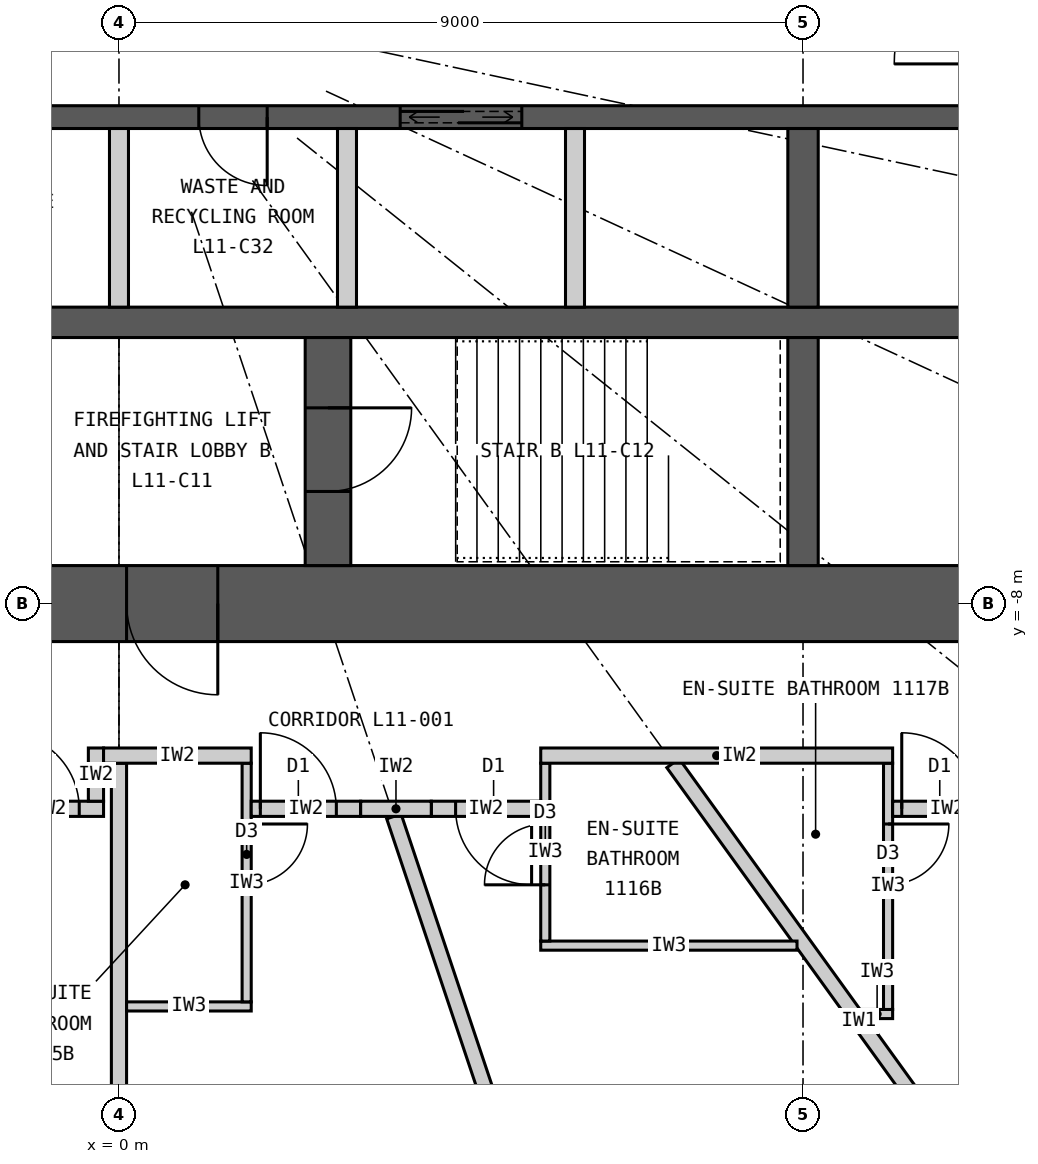
"""IFC4 building model, lengths in metres.
Left out: names, types, materials, properties, quantities, classifications, styles, units other than length and angle.
Written with IfcOpenShell. Run it as: python <this file> out.ifc"""

import sys

from ifc_helpers import new_model, si_unit, direction, frame, frame_2d, origin, place, context, subcontext, project, spatial, rectangle, extrude, element, fill, save


model = new_model("IFC4")
c1 = context("Model", 3, precision=1e-05, world=origin(), true_north=direction((0.0, 1.0)))
c2 = subcontext(c1, "Body", "Model", "MODEL_VIEW")
j1 = project(units=[si_unit("LENGTHUNIT", "METRE"), si_unit("PLANEANGLEUNIT", "RADIAN")], contexts=[c1])
p1 = place(None, origin())
s1 = spatial("IfcSite", under=j1, at=p1, CompositionType="ELEMENT")
p2 = place(p1, origin())
s2 = spatial("IfcBuilding", under=s1, at=p2, CompositionType="ELEMENT")
p3 = place(p2, frame((0.0, 0.0, 50.7)))
s3 = spatial("IfcBuildingStorey", under=s2, at=p3, CompositionType="ELEMENT", Elevation=50.7)
p4 = place(p3, frame((12.5, -8.0, 0.0), z_axis=(0.0, 0.0, 1.0), x_axis=(-1.0, 0.0, 0.0)))
e1 = element("IfcWall", 1, at=p4, inside=s3, PredefinedType="SHEAR", context=c2, shape_type="SweptSolid", body=[
    extrude(rectangle(XDim=25.0, YDim=1.0, at=frame_2d((12.5, 0.0))), origin(), (0.0, 0.0, 1.0), 3.3),
])
p5 = place(p4, frame((11.2, 0.0, 0.0)))
e2 = element("IfcOpeningElement", 2, at=p5, cuts=e1, PredefinedType="OPENING", context=c2, shape_type="SweptSolid", body=[
    extrude(rectangle(XDim=1.2, YDim=2.2, at=frame_2d((0.6, 1.1))), frame((0.0, 0.51, 0.0), z_axis=(0.0, -1.0, 0.0), x_axis=(1.0, 0.0, 0.0)), (0.0, 0.0, 1.0), 1.02),
])
p6 = place(p4, frame((18.8, 0.0, 0.0)))
e3 = element("IfcOpeningElement", 3, at=p6, cuts=e1, PredefinedType="OPENING", context=c2, shape_type="SweptSolid", body=[
    extrude(rectangle(XDim=0.9, YDim=2.2, at=frame_2d((0.45, 1.1))), frame((0.0, 0.51, 0.0), z_axis=(0.0, -1.0, 0.0), x_axis=(1.0, 0.0, 0.0)), (0.0, 0.0, 1.0), 1.02),
])
p7 = place(p3, frame((-11.5, -4.3, 0.0), z_axis=(0.0, 0.0, 1.0), x_axis=(1.0, 0.0, 0.0)))
e4 = element("IfcWall", 4, at=p7, inside=s3, PredefinedType="SHEAR", context=c2, shape_type="SweptSolid", body=[
    extrude(rectangle(XDim=23.0, YDim=0.4, at=frame_2d((11.5, 0.0))), origin(), (0.0, 0.0, 1.0), 3.3),
])
p8 = place(p3, frame((-11.5, -1.6, 0.0), z_axis=(0.0, 0.0, 1.0), x_axis=(1.0, 0.0, 0.0)))
e5 = element("IfcWall", 5, at=p8, inside=s3, PredefinedType="SHEAR", context=c2, shape_type="SweptSolid", body=[
    extrude(rectangle(XDim=23.0, YDim=0.3, at=frame_2d((11.5, 0.0))), origin(), (0.0, 0.0, 1.0), 3.3),
])
p9 = place(p8, frame((0.45, 0.0, 0.0)))
e6 = element("IfcOpeningElement", 6, at=p9, cuts=e5, PredefinedType="OPENING", context=c2, shape_type="SweptSolid", body=[
    extrude(rectangle(XDim=1.1, YDim=2.2, at=frame_2d((0.55, 1.1))), frame((0.0, 0.16, 0.0), z_axis=(0.0, -1.0, 0.0), x_axis=(1.0, 0.0, 0.0)), (0.0, 0.0, 1.0), 0.32),
])
p10 = place(p8, frame((3.45, 0.0, 0.0)))
e7 = element("IfcOpeningElement", 7, at=p10, cuts=e5, PredefinedType="OPENING", context=c2, shape_type="SweptSolid", body=[
    extrude(rectangle(XDim=1.1, YDim=2.2, at=frame_2d((0.55, 1.1))), frame((0.0, 0.16, 0.0), z_axis=(0.0, -1.0, 0.0), x_axis=(1.0, 0.0, 0.0)), (0.0, 0.0, 1.0), 0.32),
])
p11 = place(p8, frame((15.2, 0.0, 0.0)))
e8 = element("IfcOpeningElement", 8, at=p11, cuts=e5, PredefinedType="OPENING", context=c2, shape_type="SweptSolid", body=[
    extrude(rectangle(XDim=1.6, YDim=2.4, at=frame_2d((0.8, 1.2))), frame((0.0, 0.16, 0.0), z_axis=(0.0, -1.0, 0.0), x_axis=(1.0, 0.0, 0.0)), (0.0, 0.0, 1.0), 0.32),
])
p12 = place(p8, frame((8.05, 0.0, 0.0)))
e9 = element("IfcOpeningElement", 9, at=p12, cuts=e5, PredefinedType="OPENING", context=c2, shape_type="SweptSolid", body=[
    extrude(rectangle(XDim=0.9, YDim=2.2, at=frame_2d((0.45, 1.1))), frame((0.0, 0.16, 0.0), z_axis=(0.0, -1.0, 0.0), x_axis=(1.0, 0.0, 0.0)), (0.0, 0.0, 1.0), 0.32),
])
p13 = place(p8, frame((12.55, 0.0, 0.0)))
e10 = element("IfcOpeningElement", 10, at=p13, cuts=e5, PredefinedType="OPENING", context=c2, shape_type="SweptSolid", body=[
    extrude(rectangle(XDim=0.9, YDim=2.2, at=frame_2d((0.45, 1.1))), frame((0.0, 0.16, 0.0), z_axis=(0.0, -1.0, 0.0), x_axis=(1.0, 0.0, 0.0)), (0.0, 0.0, 1.0), 0.32),
])
p14 = place(p3, frame((9.0, -4.1, 0.0), z_axis=(0.0, 0.0, 1.0), x_axis=(0.0, 1.0, 0.0)))
e11 = element("IfcWall", 11, at=p14, inside=s3, PredefinedType="SHEAR", context=c2, shape_type="SweptSolid", body=[
    extrude(rectangle(XDim=2.35, YDim=0.4, at=frame_2d((1.175, 0.0))), origin(), (0.0, 0.0, 1.0), 3.3),
])
p15 = place(p3, frame((9.0, -7.5, 0.0), z_axis=(0.0, 0.0, 1.0), x_axis=(0.0, 1.0, 0.0)))
e12 = element("IfcWall", 12, at=p15, inside=s3, PredefinedType="SHEAR", context=c2, shape_type="SweptSolid", body=[
    extrude(rectangle(XDim=3.0, YDim=0.4, at=frame_2d((1.5, 0.0))), origin(), (0.0, 0.0, 1.0), 3.3),
])
p16 = place(p3, frame((2.75, -7.5, 0.0), z_axis=(0.0, 0.0, 1.0), x_axis=(0.0, 1.0, 0.0)))
e13 = element("IfcWall", 13, at=p16, inside=s3, PredefinedType="SHEAR", context=c2, shape_type="SweptSolid", body=[
    extrude(rectangle(XDim=3.0, YDim=0.6, at=frame_2d((1.5, 0.0))), origin(), (0.0, 0.0, 1.0), 3.3),
])
p17 = place(p16, frame((0.975, 0.0, 0.0)))
e14 = element("IfcOpeningElement", 14, at=p17, cuts=e13, PredefinedType="OPENING", context=c2, shape_type="SweptSolid", body=[
    extrude(rectangle(XDim=1.1, YDim=2.2, at=frame_2d((0.55, 1.1))), frame((0.0, 0.31, 0.0), z_axis=(0.0, -1.0, 0.0), x_axis=(1.0, 0.0, 0.0)), (0.0, 0.0, 1.0), 0.62),
])
for number, where, z_axis, x_axis in (
    (15, (0.0, -4.1, 0.0), (0.0, 0.0, 1.0), (0.0, 1.0, 0.0)),
    (16, (3.0, -4.1, 0.0), (0.0, 0.0, 1.0), (0.0, 1.0, 0.0)),
    (17, (6.0, -4.1, 0.0), (0.0, 0.0, 1.0), (0.0, 1.0, 0.0)),
):
    element("IfcWall", number, at=place(p3, frame(where, z_axis=z_axis, x_axis=x_axis)), inside=s3, PredefinedType="PARTITIONING", context=c2, shape_type="SweptSolid", body=[
        extrude(rectangle(XDim=2.35, YDim=0.25, at=frame_2d((1.175, 0.0))), origin(), (0.0, 0.0, 1.0), 3.3),
    ])
p18 = place(p3, frame((0.0, -10.1, 0.0), z_axis=(0.0, 0.0, 1.0), x_axis=(0.0, -1.0, 0.0)))
e18 = element("IfcWall", 18, at=p18, inside=s3, PredefinedType="PARTITIONING", context=c2, shape_type="SweptSolid", body=[
    extrude(rectangle(XDim=9.25, YDim=0.2, at=frame_2d((4.625, 0.0))), origin(), (0.0, 0.0, 1.0), 2.32),
])
p19 = place(p3, frame((3.617, -10.8, 0.0), z_axis=(0.0, 0.0, 1.0), x_axis=(0.317576599239, -0.948232621046, 0.0)))
e19 = element("IfcWall", 19, at=p19, inside=s3, PredefinedType="PARTITIONING", context=c2, shape_type="SweptSolid", body=[
    extrude(rectangle(XDim=8.36, YDim=0.2, at=frame_2d((4.18, 0.0))), origin(), (0.0, 0.0, 1.0), 2.32),
])
p20 = place(p3, frame((7.289, -10.1, 0.0), z_axis=(0.0, 0.0, 1.0), x_axis=(0.585198353053, -0.810890182197, 0.0)))
e20 = element("IfcWall", 20, at=p20, inside=s3, PredefinedType="PARTITIONING", context=c2, shape_type="SweptSolid", body=[
    extrude(rectangle(XDim=8.36, YDim=0.2, at=frame_2d((4.18, 0.0))), origin(), (0.0, 0.0, 1.0), 2.32),
])
p21 = place(p3, frame((0.1, -13.3, 0.0), z_axis=(0.0, 0.0, 1.0), x_axis=(1.0, 0.0, 0.0)))
e21 = element("IfcWall", 21, at=p21, inside=s3, PredefinedType="PARTITIONING", context=c2, shape_type="SweptSolid", body=[
    extrude(rectangle(XDim=1.64, YDim=0.12, at=frame_2d((0.82, 0.0))), origin(), (0.0, 0.0, 1.0), 3.12),
])
p22 = place(p3, frame((1.68, -10.1, 0.0), z_axis=(0.0, 0.0, 1.0), x_axis=(0.0, -1.0, 0.0)))
e22 = element("IfcWall", 22, at=p22, inside=s3, PredefinedType="PARTITIONING", context=c2, shape_type="SweptSolid", body=[
    extrude(rectangle(XDim=3.14, YDim=0.12, at=frame_2d((1.57, 0.0))), origin(), (0.0, 0.0, 1.0), 3.12),
])
p23 = place(p22, frame((0.8, 0.0, 0.0)))
e23 = element("IfcOpeningElement", 23, at=p23, cuts=e22, PredefinedType="OPENING", context=c2, shape_type="SweptSolid", body=[
    extrude(rectangle(XDim=0.8, YDim=2.1, at=frame_2d((0.4, 1.05))), frame((0.0, 0.07, 0.0), z_axis=(0.0, -1.0, 0.0), x_axis=(1.0, 0.0, 0.0)), (0.0, 0.0, 1.0), 0.14),
])
p24 = place(p3, frame((8.921, -12.5, 0.0), z_axis=(0.0, 0.0, 1.0), x_axis=(-1.0, 0.0, 0.0)))
e24 = element("IfcWall", 24, at=p24, inside=s3, PredefinedType="PARTITIONING", context=c2, shape_type="SweptSolid", body=[
    extrude(rectangle(XDim=3.372, YDim=0.12, at=frame_2d((1.686, 0.0))), origin(), (0.0, 0.0, 1.0), 3.12),
])
p25 = place(p3, frame((5.609, -10.1, 0.0), z_axis=(0.0, 0.0, 1.0), x_axis=(0.0, -1.0, 0.0)))
e25 = element("IfcWall", 25, at=p25, inside=s3, PredefinedType="PARTITIONING", context=c2, shape_type="SweptSolid", body=[
    extrude(rectangle(XDim=2.34, YDim=0.12, at=frame_2d((1.17, 0.0))), origin(), (0.0, 0.0, 1.0), 3.12),
])
p26 = place(p25, frame((0.8, 0.0, 0.0)))
e26 = element("IfcOpeningElement", 26, at=p26, cuts=e25, PredefinedType="OPENING", context=c2, shape_type="SweptSolid", body=[
    extrude(rectangle(XDim=0.8, YDim=2.1, at=frame_2d((0.4, 1.05))), frame((0.0, 0.07, 0.0), z_axis=(0.0, -1.0, 0.0), x_axis=(1.0, 0.0, 0.0)), (0.0, 0.0, 1.0), 0.14),
])
p27 = place(p3, frame((9.771, -13.4, 0.0), z_axis=(0.0, 0.0, 1.0), x_axis=(1.0, 0.0, 0.0)))
e27 = element("IfcWall", 27, at=p27, inside=s3, PredefinedType="PARTITIONING", context=c2, shape_type="SweptSolid", body=[
    extrude(rectangle(XDim=0.408, YDim=0.12, at=frame_2d((0.204, 0.0))), origin(), (0.0, 0.0, 1.0), 3.12),
])
p28 = place(p3, frame((10.119, -10.1, 0.0), z_axis=(0.0, 0.0, 1.0), x_axis=(0.0, -1.0, 0.0)))
e28 = element("IfcWall", 28, at=p28, inside=s3, PredefinedType="PARTITIONING", context=c2, shape_type="SweptSolid", body=[
    extrude(rectangle(XDim=3.24, YDim=0.12, at=frame_2d((1.62, 0.0))), origin(), (0.0, 0.0, 1.0), 3.12),
])
p29 = place(p28, frame((0.8, 0.0, 0.0)))
e29 = element("IfcOpeningElement", 29, at=p29, cuts=e28, PredefinedType="OPENING", context=c2, shape_type="SweptSolid", body=[
    extrude(rectangle(XDim=0.8, YDim=2.1, at=frame_2d((0.4, 1.05))), frame((0.0, 0.07, 0.0), z_axis=(0.0, -1.0, 0.0), x_axis=(1.0, 0.0, 0.0)), (0.0, 0.0, 1.0), 0.14),
])
p30 = place(p3, frame((-0.203, -10.7, 0.0), z_axis=(0.0, 0.0, 1.0), x_axis=(-1.0, 0.0, 0.0)))
e30 = element("IfcWall", 30, at=p30, inside=s3, PredefinedType="PARTITIONING", context=c2, shape_type="SweptSolid", body=[
    extrude(rectangle(XDim=1.44, YDim=0.2, at=frame_2d((0.72, 0.0))), origin(), (0.0, 0.0, 1.0), 3.12),
])
p31 = place(p30, frame((0.32, 0.0, 0.0)))
e31 = element("IfcOpeningElement", 31, at=p31, cuts=e30, PredefinedType="OPENING", context=c2, shape_type="SweptSolid", body=[
    extrude(rectangle(XDim=1.0, YDim=2.2, at=frame_2d((0.5, 1.1))), frame((0.0, 0.11, 0.0), z_axis=(0.0, -1.0, 0.0), x_axis=(1.0, 0.0, 0.0)), (0.0, 0.0, 1.0), 0.22),
])
p32 = place(p3, frame((-0.303, -9.9, 0.0), z_axis=(0.0, 0.0, 1.0), x_axis=(0.0, -1.0, 0.0)))
e32 = element("IfcWall", 32, at=p32, inside=s3, PredefinedType="PARTITIONING", context=c2, shape_type="SweptSolid", body=[
    extrude(rectangle(XDim=0.7, YDim=0.2, at=frame_2d((0.35, 0.0))), origin(), (0.0, 0.0, 1.0), 3.12),
])
p33 = place(p3, frame((3.18, -10.7, 0.0), z_axis=(0.0, 0.0, 1.0), x_axis=(-1.0, 0.0, 0.0)))
e33 = element("IfcWall", 33, at=p33, inside=s3, PredefinedType="PARTITIONING", context=c2, shape_type="SweptSolid", body=[
    extrude(rectangle(XDim=1.44, YDim=0.2, at=frame_2d((0.72, 0.0))), origin(), (0.0, 0.0, 1.0), 3.12),
])
p34 = place(p33, frame((0.32, 0.0, 0.0)))
e34 = element("IfcOpeningElement", 34, at=p34, cuts=e33, PredefinedType="OPENING", context=c2, shape_type="SweptSolid", body=[
    extrude(rectangle(XDim=1.0, YDim=2.2, at=frame_2d((0.5, 1.1))), frame((0.0, 0.11, 0.0), z_axis=(0.0, -1.0, 0.0), x_axis=(1.0, 0.0, 0.0)), (0.0, 0.0, 1.0), 0.22),
])
p35 = place(p3, frame((5.549, -10.7, 0.0), z_axis=(0.0, 0.0, 1.0), x_axis=(-1.0, 0.0, 0.0)))
e35 = element("IfcWall", 35, at=p35, inside=s3, PredefinedType="PARTITIONING", context=c2, shape_type="SweptSolid", body=[
    extrude(rectangle(XDim=1.44, YDim=0.2, at=frame_2d((0.72, 0.0))), origin(), (0.0, 0.0, 1.0), 3.12),
])
p36 = place(p35, frame((0.12, 0.0, 0.0)))
e36 = element("IfcOpeningElement", 36, at=p36, cuts=e35, PredefinedType="OPENING", context=c2, shape_type="SweptSolid", body=[
    extrude(rectangle(XDim=1.0, YDim=2.2, at=frame_2d((0.5, 1.1))), frame((0.0, 0.11, 0.0), z_axis=(0.0, -1.0, 0.0), x_axis=(1.0, 0.0, 0.0)), (0.0, 0.0, 1.0), 0.22),
])
p37 = place(p3, frame((11.619, -10.7, 0.0), z_axis=(0.0, 0.0, 1.0), x_axis=(-1.0, 0.0, 0.0)))
e37 = element("IfcWall", 37, at=p37, inside=s3, PredefinedType="PARTITIONING", context=c2, shape_type="SweptSolid", body=[
    extrude(rectangle(XDim=1.44, YDim=0.2, at=frame_2d((0.72, 0.0))), origin(), (0.0, 0.0, 1.0), 3.12),
])
p38 = place(p37, frame((0.32, 0.0, 0.0)))
e38 = element("IfcOpeningElement", 38, at=p38, cuts=e37, PredefinedType="OPENING", context=c2, shape_type="SweptSolid", body=[
    extrude(rectangle(XDim=1.0, YDim=2.2, at=frame_2d((0.5, 1.1))), frame((0.0, 0.11, 0.0), z_axis=(0.0, -1.0, 0.0), x_axis=(1.0, 0.0, 0.0)), (0.0, 0.0, 1.0), 0.22),
])
p39 = place(p3, frame((4.109, -10.7, 0.0), z_axis=(0.0, 0.0, 1.0), x_axis=(-1.0, 0.0, 0.0)))
e39 = element("IfcWall", 39, at=p39, inside=s3, PredefinedType="PARTITIONING", context=c2, shape_type="SweptSolid", body=[
    extrude(rectangle(XDim=0.929, YDim=0.2, at=frame_2d((0.465, 0.0))), origin(), (0.0, 0.0, 1.0), 3.12),
])
p40 = place(p3, frame((10.179, -10.0, 0.0), z_axis=(0.0, 0.0, 1.0), x_axis=(-1.0, 0.0, 0.0)))
e40 = element("IfcWall", 40, at=p40, inside=s3, PredefinedType="PARTITIONING", context=c2, shape_type="SweptSolid", body=[
    extrude(rectangle(XDim=4.63, YDim=0.2, at=frame_2d((2.315, 0.0))), origin(), (0.0, 0.0, 1.0), 3.12),
])
p41 = place(p3, frame((1.74, -10.0, 0.0), z_axis=(0.0, 0.0, 1.0), x_axis=(-1.0, 0.0, 0.0)))
e41 = element("IfcWall", 41, at=p41, inside=s3, PredefinedType="PARTITIONING", context=c2, shape_type="SweptSolid", body=[
    extrude(rectangle(XDim=1.943, YDim=0.2, at=frame_2d((0.971, 0.0))), origin(), (0.0, 0.0, 1.0), 3.12),
])
p42 = place(p31, origin())
e42 = element("IfcDoor", 42, at=p42, inside=s3, OperationType="SINGLE_SWING_RIGHT", PredefinedType="DOOR", context=c2, shape_type="SweptSolid", body=[
    extrude(rectangle(XDim=1.0, YDim=2.2, at=frame_2d((0.5, 1.1))), frame((0.0, 0.025, 0.0), z_axis=(0.0, -1.0, 0.0), x_axis=(1.0, 0.0, 0.0)), (0.0, 0.0, 1.0), 0.05),
])
fill(e31, e42)
p43 = place(p23, origin())
e43 = element("IfcDoor", 43, at=p43, inside=s3, OperationType="SINGLE_SWING_LEFT", PredefinedType="DOOR", context=c2, shape_type="SweptSolid", body=[
    extrude(rectangle(XDim=0.8, YDim=2.1, at=frame_2d((0.4, 1.05))), frame((0.0, 0.025, 0.0), z_axis=(0.0, -1.0, 0.0), x_axis=(1.0, 0.0, 0.0)), (0.0, 0.0, 1.0), 0.05),
])
fill(e23, e43)
p44 = place(p34, origin())
e44 = element("IfcDoor", 44, at=p44, inside=s3, OperationType="SINGLE_SWING_RIGHT", PredefinedType="DOOR", context=c2, shape_type="SweptSolid", body=[
    extrude(rectangle(XDim=1.0, YDim=2.2, at=frame_2d((0.5, 1.1))), frame((0.0, 0.025, 0.0), z_axis=(0.0, -1.0, 0.0), x_axis=(1.0, 0.0, 0.0)), (0.0, 0.0, 1.0), 0.05),
])
fill(e34, e44)
p45 = place(p26, origin())
e45 = element("IfcDoor", 45, at=p45, inside=s3, OperationType="SINGLE_SWING_RIGHT", PredefinedType="DOOR", context=c2, shape_type="SweptSolid", body=[
    extrude(rectangle(XDim=0.8, YDim=2.1, at=frame_2d((0.4, 1.05))), frame((0.0, 0.025, 0.0), z_axis=(0.0, -1.0, 0.0), x_axis=(1.0, 0.0, 0.0)), (0.0, 0.0, 1.0), 0.05),
])
fill(e26, e45)
p46 = place(p36, origin())
e46 = element("IfcDoor", 46, at=p46, inside=s3, OperationType="SINGLE_SWING_LEFT", PredefinedType="DOOR", context=c2, shape_type="SweptSolid", body=[
    extrude(rectangle(XDim=1.0, YDim=2.2, at=frame_2d((0.5, 1.1))), frame((0.0, 0.025, 0.0), z_axis=(0.0, -1.0, 0.0), x_axis=(1.0, 0.0, 0.0)), (0.0, 0.0, 1.0), 0.05),
])
fill(e36, e46)
p47 = place(p29, origin())
e47 = element("IfcDoor", 47, at=p47, inside=s3, OperationType="SINGLE_SWING_LEFT", PredefinedType="DOOR", context=c2, shape_type="SweptSolid", body=[
    extrude(rectangle(XDim=0.8, YDim=2.1, at=frame_2d((0.4, 1.05))), frame((0.0, 0.025, 0.0), z_axis=(0.0, -1.0, 0.0), x_axis=(1.0, 0.0, 0.0)), (0.0, 0.0, 1.0), 0.05),
])
fill(e29, e47)
p48 = place(p38, origin())
e48 = element("IfcDoor", 48, at=p48, inside=s3, OperationType="SINGLE_SWING_RIGHT", PredefinedType="DOOR", context=c2, shape_type="SweptSolid", body=[
    extrude(rectangle(XDim=1.0, YDim=2.2, at=frame_2d((0.5, 1.1))), frame((0.0, 0.025, 0.0), z_axis=(0.0, -1.0, 0.0), x_axis=(1.0, 0.0, 0.0)), (0.0, 0.0, 1.0), 0.05),
])
fill(e38, e48)
p49 = place(p5, origin())
e49 = element("IfcDoor", 49, at=p49, inside=s3, OperationType="SINGLE_SWING_LEFT", PredefinedType="DOOR", context=c2, shape_type="SweptSolid", body=[
    extrude(rectangle(XDim=1.2, YDim=2.2, at=frame_2d((0.6, 1.1))), frame((0.0, 0.025, 0.0), z_axis=(0.0, -1.0, 0.0), x_axis=(1.0, 0.0, 0.0)), (0.0, 0.0, 1.0), 0.05),
])
fill(e2, e49)
p50 = place(p17, origin())
e50 = element("IfcDoor", 50, at=p50, inside=s3, OperationType="SINGLE_SWING_RIGHT", PredefinedType="DOOR", context=c2, shape_type="SweptSolid", body=[
    extrude(rectangle(XDim=1.1, YDim=2.2, at=frame_2d((0.55, 1.1))), frame((0.0, 0.025, 0.0), z_axis=(0.0, -1.0, 0.0), x_axis=(1.0, 0.0, 0.0)), (0.0, 0.0, 1.0), 0.05),
])
fill(e14, e50)
p51 = place(p11, origin())
e51 = element("IfcDoor", 51, at=p51, inside=s3, OperationType="DOUBLE_DOOR_SLIDING", PredefinedType="DOOR", context=c2, shape_type="SweptSolid", body=[
    extrude(rectangle(XDim=1.6, YDim=2.4, at=frame_2d((0.8, 1.2))), frame((0.0, 0.025, 0.0), z_axis=(0.0, -1.0, 0.0), x_axis=(1.0, 0.0, 0.0)), (0.0, 0.0, 1.0), 0.05),
])
fill(e8, e51)
p52 = place(p13, origin())
e52 = element("IfcDoor", 52, at=p52, inside=s3, OperationType="SINGLE_SWING_RIGHT", PredefinedType="DOOR", context=c2, shape_type="SweptSolid", body=[
    extrude(rectangle(XDim=0.9, YDim=2.2, at=frame_2d((0.45, 1.1))), frame((0.0, 0.025, 0.0), z_axis=(0.0, -1.0, 0.0), x_axis=(1.0, 0.0, 0.0)), (0.0, 0.0, 1.0), 0.05),
])
fill(e10, e52)
save(model, sys.argv[1])
